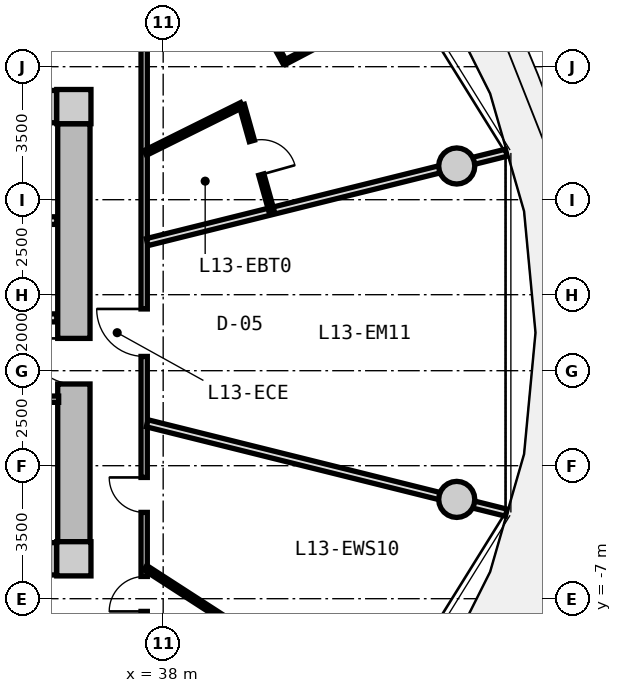
"""IFC4 building model, lengths in metres.
Left out: names, types, materials, properties, quantities, classifications, styles, units other than length and angle.
Written with IfcOpenShell. Run it as: python <this file> out.ifc"""

import sys

from ifc_helpers import new_model, si_unit, direction, frame, frame_2d, origin, origin_2d, place, context, subcontext, project, spatial, rectangle, circle, extrude, source, transform, mapped, element, fill, save


model = new_model("IFC4")
c1 = context("Model", 3, precision=1e-05, world=origin(), true_north=direction((0.0, 1.0)))
c2 = subcontext(c1, "Body", "Model", "MODEL_VIEW")
j1 = project(units=[si_unit("LENGTHUNIT", "METRE"), si_unit("PLANEANGLEUNIT", "RADIAN")], contexts=[c1])
p1 = place(None, origin())
s1 = spatial("IfcSite", under=j1, at=p1, CompositionType="ELEMENT")
p2 = place(p1, origin())
s2 = spatial("IfcBuilding", under=s1, at=p2, CompositionType="ELEMENT")
p3 = place(p2, frame((0.0, 0.0, 46.0)))
s3 = spatial("IfcBuildingStorey", under=s2, at=p3, CompositionType="ELEMENT", Elevation=46.0)
m1 = source(origin(), c2, "Body", "SweptSolid", [
    extrude(rectangle(XDim=0.9, YDim=0.9, at=origin_2d()), origin(), (0.0, 0.0, 1.0), 3.05),
])
for number, where, z_axis, x_axis in (
    (1, (35.65, -5.95, 0.0), (0.0, 0.0, 1.0), (1.0, 0.0, 0.0)),
    (2, (35.65, 5.95, 0.0), (0.0, 0.0, 1.0), (1.0, 0.0, 0.0)),
):
    element("IfcColumn", number, at=place(p3, frame(where, z_axis=z_axis, x_axis=x_axis)), inside=s3, PredefinedType="COLUMN", context=c2, shape_type="MappedRepresentation", body=[
        mapped(m1, transform((0.0, 0.0, 0.0), x_axis=(1.0, 0.0, 0.0), y_axis=(0.0, 1.0, 0.0), z_axis=(0.0, 0.0, 1.0), scale=1.0)),
    ])
m2 = source(origin(), c2, "Body", "SweptSolid", [
    extrude(rectangle(XDim=14.4, YDim=0.85, at=frame_2d((7.2, 0.0))), origin(), (0.0, 0.0, 1.0), 2.79),
])
for number, where, z_axis, x_axis in (
    (3, (20.8, 5.95, 0.0), (0.0, 0.0, 1.0), (1.0, 0.0, 0.0)),
    (4, (35.2, -5.95, 0.0), (0.0, 0.0, 1.0), (-1.0, 0.0, 0.0)),
):
    element("IfcWall", number, at=place(p3, frame(where, z_axis=z_axis, x_axis=x_axis)), inside=s3, PredefinedType="SHEAR", context=c2, shape_type="MappedRepresentation", body=[
        mapped(m2, transform((0.0, 0.0, 0.0), x_axis=(1.0, 0.0, 0.0), y_axis=(0.0, 1.0, 0.0), z_axis=(0.0, 0.0, 1.0), scale=1.0)),
    ])
m3 = source(origin(), c2, "Body", "SweptSolid", [
    extrude(rectangle(XDim=11.0, YDim=0.85, at=frame_2d((5.5, 0.0))), origin(), (0.0, 0.0, 1.0), 2.79),
])
p4 = place(p3, frame((35.65, 5.5, 0.0), z_axis=(0.0, 0.0, 1.0), x_axis=(0.0, -1.0, 0.0)))
e5 = element("IfcWall", 5, at=p4, inside=s3, PredefinedType="SHEAR", context=c2, shape_type="MappedRepresentation", body=[
    mapped(m3, transform((0.0, 0.0, 0.0), x_axis=(1.0, 0.0, 0.0), y_axis=(0.0, 1.0, 0.0), z_axis=(0.0, 0.0, 1.0), scale=1.0)),
])
p5 = place(p4, frame((5.65, 0.0, 0.0)))
e6 = element("IfcOpeningElement", 6, at=p5, cuts=e5, PredefinedType="OPENING", context=c2, shape_type="SweptSolid", body=[
    extrude(rectangle(XDim=1.2, YDim=2.15, at=frame_2d((0.6, 1.075))), frame((0.0, 0.435, 0.0), z_axis=(0.0, -1.0, 0.0), x_axis=(1.0, 0.0, 0.0)), (0.0, 0.0, 1.0), 0.87),
])
m4 = source(origin(), c2, "Body", "SweptSolid", [
    extrude(circle(Radius=0.475, at=origin_2d()), origin(), (0.0, 0.0, 1.0), 3.05),
])
for number, where, z_axis, x_axis in (
    (7, (45.725, 4.387, 0.0), (0.0, 0.0, 1.0), (1.0, 0.0, 0.0)),
    (8, (45.725, -4.387, 0.0), (0.0, 0.0, 1.0), (1.0, 0.0, 0.0)),
):
    element("IfcColumn", number, at=place(p3, frame(where, z_axis=z_axis, x_axis=x_axis)), inside=s3, PredefinedType="COLUMN", context=c2, shape_type="MappedRepresentation", body=[
        mapped(m4, transform((0.0, 0.0, 0.0), x_axis=(1.0, 0.0, 0.0), y_axis=(0.0, 1.0, 0.0), z_axis=(0.0, 0.0, 1.0), scale=1.0)),
    ])
m5 = source(origin(), c2, "Body", "SweptSolid", [
    extrude(rectangle(XDim=3.2, YDim=0.2, at=frame_2d((1.6, 0.0))), origin(), (0.0, 0.0, 1.0), 2.775),
])
p6 = place(p3, frame((32.0, 2.95, 0.0), z_axis=(0.0, 0.0, 1.0), x_axis=(1.0, 0.0, 0.0)))
e9 = element("IfcWall", 9, at=p6, inside=s3, PredefinedType="PARTITIONING", context=c2, shape_type="MappedRepresentation", body=[
    mapped(m5, transform((0.0, 0.0, 0.0), x_axis=(1.0, 0.0, 0.0), y_axis=(0.0, 1.0, 0.0), z_axis=(0.0, 0.0, 1.0), scale=1.0)),
])
m6 = source(origin(), c2, "Body", "SweptSolid", [
    extrude(rectangle(XDim=6.66, YDim=0.21, at=frame_2d((3.33, 0.0))), origin(), (0.0, 0.0, 1.0), 2.775),
])
p7 = place(p3, frame((28.54, 0.39, 0.0), z_axis=(0.0, 0.0, 1.0), x_axis=(1.0, 0.0, 0.0)))
e10 = element("IfcWall", 10, at=p7, inside=s3, PredefinedType="PARTITIONING", context=c2, shape_type="MappedRepresentation", body=[
    mapped(m6, transform((0.0, 0.0, 0.0), x_axis=(1.0, 0.0, 0.0), y_axis=(0.0, 1.0, 0.0), z_axis=(0.0, 0.0, 1.0), scale=1.0)),
])
p8 = place(p7, frame((1.0, 0.0, 0.0)))
e11 = element("IfcOpeningElement", 11, at=p8, cuts=e10, PredefinedType="OPENING", context=c2, shape_type="SweptSolid", body=[
    extrude(rectangle(XDim=1.2, YDim=2.15, at=frame_2d((0.6, 1.075))), frame((0.0, 0.115, 0.0), z_axis=(0.0, -1.0, 0.0), x_axis=(1.0, 0.0, 0.0)), (0.0, 0.0, 1.0), 0.23),
])
m7 = source(origin(), c2, "Body", "SweptSolid", [
    extrude(rectangle(XDim=2.7, YDim=0.165, at=frame_2d((1.35, 0.0))), origin(), (0.0, 0.0, 1.0), 2.775),
])
p9 = place(p3, frame((32.55, -1.75, 0.0), z_axis=(0.0, 0.0, 1.0), x_axis=(1.0, 0.0, 0.0)))
e12 = element("IfcWall", 12, at=p9, inside=s3, PredefinedType="PARTITIONING", context=c2, shape_type="MappedRepresentation", body=[
    mapped(m7, transform((0.0, 0.0, 0.0), x_axis=(1.0, 0.0, 0.0), y_axis=(0.0, 1.0, 0.0), z_axis=(0.0, 0.0, 1.0), scale=1.0)),
])
p10 = place(p9, frame((0.85, 0.0, 0.0)))
e13 = element("IfcOpeningElement", 13, at=p10, cuts=e12, PredefinedType="OPENING", context=c2, shape_type="SweptSolid", body=[
    extrude(rectangle(XDim=0.925, YDim=2.1, at=frame_2d((0.462, 1.05))), frame((0.0, 0.093, 0.0), z_axis=(0.0, -1.0, 0.0), x_axis=(1.0, 0.0, 0.0)), (0.0, 0.0, 1.0), 0.185),
])
m8 = source(origin(), c2, "Body", "SweptSolid", [
    extrude(rectangle(XDim=15.6, YDim=0.165, at=frame_2d((7.8, 0.0))), origin(), (0.0, 0.0, 1.0), 2.775),
])
p11 = place(p3, frame((37.5, 7.8, 0.0), z_axis=(0.0, 0.0, 1.0), x_axis=(0.0, -1.0, 0.0)))
e14 = element("IfcWall", 14, at=p11, inside=s3, PredefinedType="PARTITIONING", context=c2, shape_type="MappedRepresentation", body=[
    mapped(m8, transform((0.0, 0.0, 0.0), x_axis=(1.0, 0.0, 0.0), y_axis=(0.0, 1.0, 0.0), z_axis=(0.0, 0.0, 1.0), scale=1.0)),
])
p12 = place(p11, frame((14.215, 0.0, 0.0)))
e15 = element("IfcOpeningElement", 15, at=p12, cuts=e14, PredefinedType="OPENING", context=c2, shape_type="SweptSolid", body=[
    extrude(rectangle(XDim=0.92, YDim=2.1, at=frame_2d((0.46, 1.05))), frame((0.0, 0.093, 0.0), z_axis=(0.0, -1.0, 0.0), x_axis=(1.0, 0.0, 0.0)), (0.0, 0.0, 1.0), 0.185),
])
p13 = place(p11, frame((11.609, 0.0, 0.0)))
e16 = element("IfcOpeningElement", 16, at=p13, cuts=e14, PredefinedType="OPENING", context=c2, shape_type="SweptSolid", body=[
    extrude(rectangle(XDim=0.92, YDim=2.1, at=frame_2d((0.46, 1.05))), frame((0.0, 0.093, 0.0), z_axis=(0.0, -1.0, 0.0), x_axis=(1.0, 0.0, 0.0)), (0.0, 0.0, 1.0), 0.185),
])
p14 = place(p11, frame((7.175, 0.0, 0.0)))
e17 = element("IfcOpeningElement", 17, at=p14, cuts=e14, PredefinedType="OPENING", context=c2, shape_type="SweptSolid", body=[
    extrude(rectangle(XDim=1.25, YDim=2.2, at=frame_2d((0.625, 1.1))), frame((0.0, 0.093, 0.0), z_axis=(0.0, -1.0, 0.0), x_axis=(1.0, 0.0, 0.0)), (0.0, 0.0, 1.0), 0.185),
])
m9 = source(origin(), c2, "Body", "SweptSolid", [
    extrude(rectangle(XDim=9.737, YDim=0.19, at=frame_2d((4.869, 0.0))), origin(), (0.0, 0.0, 1.0), 2.225),
])
p15 = place(p3, frame((37.58, -2.385, 0.0), z_axis=(0.0, 0.0, 1.0), x_axis=(0.970392716238, -0.241532557375, 0.0)))
e18 = element("IfcWall", 18, at=p15, inside=s3, PredefinedType="PARTITIONING", context=c2, shape_type="MappedRepresentation", body=[
    mapped(m9, transform((0.0, 0.0, 0.0), x_axis=(1.0, 0.0, 0.0), y_axis=(0.0, 1.0, 0.0), z_axis=(0.0, 0.0, 1.0), scale=1.0)),
])
m10 = source(origin(), c2, "Body", "SweptSolid", [
    extrude(rectangle(XDim=7.304, YDim=0.14, at=frame_2d((3.652, 0.0))), origin(), (0.0, 0.0, 1.0), 2.775),
])
p16 = place(p3, frame((37.53, -6.185, 0.0), z_axis=(0.0, 0.0, 1.0), x_axis=(0.83973870965, -0.54299069929, 0.0)))
e19 = element("IfcWall", 19, at=p16, inside=s3, PredefinedType="PARTITIONING", context=c2, shape_type="MappedRepresentation", body=[
    mapped(m10, transform((0.0, 0.0, 0.0), x_axis=(1.0, 0.0, 0.0), y_axis=(0.0, 1.0, 0.0), z_axis=(0.0, 0.0, 1.0), scale=1.0)),
])
p17 = place(p3, frame((37.58, 2.385, 0.0), z_axis=(0.0, 0.0, 1.0), x_axis=(0.970392716238, 0.241532557375, 0.0)))
e20 = element("IfcWall", 20, at=p17, inside=s3, PredefinedType="PARTITIONING", context=c2, shape_type="MappedRepresentation", body=[
    mapped(m9, transform((0.0, 0.0, 0.0), x_axis=(1.0, 0.0, 0.0), y_axis=(0.0, 1.0, 0.0), z_axis=(0.0, 0.0, 1.0), scale=1.0)),
])
m11 = source(origin(), c2, "Body", "SweptSolid", [
    extrude(rectangle(XDim=2.834, YDim=0.14, at=frame_2d((1.417, 0.0))), origin(), (0.0, 0.0, 1.0), 2.775),
])
p18 = place(p3, frame((37.53, 4.732, 0.0), z_axis=(0.0, 0.0, 1.0), x_axis=(0.895681174462, 0.444696788513, 0.0)))
e21 = element("IfcWall", 21, at=p18, inside=s3, PredefinedType="PARTITIONING", context=c2, shape_type="MappedRepresentation", body=[
    mapped(m11, transform((0.0, 0.0, 0.0), x_axis=(1.0, 0.0, 0.0), y_axis=(0.0, 1.0, 0.0), z_axis=(0.0, 0.0, 1.0), scale=1.0)),
])
m12 = source(origin(), c2, "Body", "SweptSolid", [
    extrude(rectangle(XDim=2.885, YDim=0.14, at=frame_2d((1.442, 0.0))), origin(), (0.0, 0.0, 1.0), 2.775),
])
p19 = place(p3, frame((40.069, 5.992, 0.0), z_axis=(0.0, 0.0, 1.0), x_axis=(0.269799431837, -0.962916541856, 0.0)))
e22 = element("IfcWall", 22, at=p19, inside=s3, PredefinedType="PARTITIONING", context=c2, shape_type="MappedRepresentation", body=[
    mapped(m12, transform((0.0, 0.0, 0.0), x_axis=(1.0, 0.0, 0.0), y_axis=(0.0, 1.0, 0.0), z_axis=(0.0, 0.0, 1.0), scale=1.0)),
])
p20 = place(p19, frame((0.982, 0.0, 0.0)))
e23 = element("IfcOpeningElement", 23, at=p20, cuts=e22, PredefinedType="OPENING", context=c2, shape_type="SweptSolid", body=[
    extrude(rectangle(XDim=0.92, YDim=2.1, at=frame_2d((0.46, 1.05))), frame((0.0, 0.08, 0.0), z_axis=(0.0, -1.0, 0.0), x_axis=(1.0, 0.0, 0.0)), (0.0, 0.0, 1.0), 0.16),
])
m13 = source(origin(), c2, "Body", "SweptSolid", [
    extrude(rectangle(XDim=3.706, YDim=0.115, at=frame_2d((1.853, 0.0))), origin(), (0.0, 0.0, 1.0), 2.775),
])
p21 = place(p3, frame((41.198, 7.115, 0.0), z_axis=(0.0, 0.0, 1.0), x_axis=(0.88538502503, 0.464858427322, 0.0)))
e24 = element("IfcWall", 24, at=p21, inside=s3, PredefinedType="PARTITIONING", context=c2, shape_type="MappedRepresentation", body=[
    mapped(m13, transform((0.0, 0.0, 0.0), x_axis=(1.0, 0.0, 0.0), y_axis=(0.0, 1.0, 0.0), z_axis=(0.0, 0.0, 1.0), scale=1.0)),
])
m14 = source(origin(), c2, "Body", "SweptSolid", [
    extrude(rectangle(XDim=3.926, YDim=0.115, at=frame_2d((1.963, 0.0))), origin(), (0.0, 0.0, 1.0), 2.775),
])
p22 = place(p3, frame((41.198, 7.115, 0.0), z_axis=(0.0, 0.0, 1.0), x_axis=(-0.483037889915, 0.875599450038, 0.0)))
e25 = element("IfcWall", 25, at=p22, inside=s3, PredefinedType="PARTITIONING", context=c2, shape_type="MappedRepresentation", body=[
    mapped(m14, transform((0.0, 0.0, 0.0), x_axis=(1.0, 0.0, 0.0), y_axis=(0.0, 1.0, 0.0), z_axis=(0.0, 0.0, 1.0), scale=1.0)),
])
p23 = place(p22, frame((1.488, 0.0, 0.0)))
e26 = element("IfcOpeningElement", 26, at=p23, cuts=e25, PredefinedType="OPENING", context=c2, shape_type="SweptSolid", body=[
    extrude(rectangle(XDim=0.95, YDim=2.1, at=frame_2d((0.475, 1.05))), frame((0.0, 0.067, 0.0), z_axis=(0.0, -1.0, 0.0), x_axis=(1.0, 0.0, 0.0)), (0.0, 0.0, 1.0), 0.135),
])
m15 = source(origin(), c2, "Body", "SweptSolid", [
    extrude(rectangle(XDim=1.2, YDim=2.15, at=frame_2d((0.6, 1.075))), frame((0.0, 0.025, 0.0), z_axis=(0.0, -1.0, 0.0), x_axis=(1.0, 0.0, 0.0)), (0.0, 0.0, 1.0), 0.05),
])
p24 = place(p5, frame((1.2, 0.0, 0.0), z_axis=(0.0, 0.0, 1.0), x_axis=(-1.0, 0.0, 0.0)))
e27 = element("IfcDoor", 27, at=p24, inside=s3, OperationType="SINGLE_SWING_RIGHT", PredefinedType="DOOR", context=c2, shape_type="MappedRepresentation", body=[
    mapped(m15, transform((0.0, 0.0, 0.0), x_axis=(1.0, 0.0, 0.0), y_axis=(0.0, 1.0, 0.0), z_axis=(0.0, 0.0, 1.0), scale=1.0)),
])
fill(e6, e27)
m16 = source(origin(), c2, "Body", "SweptSolid", [
    extrude(rectangle(XDim=0.92, YDim=2.1, at=frame_2d((0.46, 1.05))), frame((0.0, 0.025, 0.0), z_axis=(0.0, -1.0, 0.0), x_axis=(1.0, 0.0, 0.0)), (0.0, 0.0, 1.0), 0.05),
])
p25 = place(p12, frame((0.92, 0.0, 0.0), z_axis=(0.0, 0.0, 1.0), x_axis=(-1.0, 0.0, 0.0)))
e28 = element("IfcDoor", 28, at=p25, inside=s3, OperationType="SINGLE_SWING_LEFT", PredefinedType="DOOR", context=c2, shape_type="MappedRepresentation", body=[
    mapped(m16, transform((0.0, 0.0, 0.0), x_axis=(1.0, 0.0, 0.0), y_axis=(0.0, 1.0, 0.0), z_axis=(0.0, 0.0, 1.0), scale=1.0)),
])
fill(e15, e28)
p26 = place(p13, frame((0.92, 0.0, 0.0), z_axis=(0.0, 0.0, 1.0), x_axis=(-1.0, 0.0, 0.0)))
e29 = element("IfcDoor", 29, at=p26, inside=s3, OperationType="SINGLE_SWING_RIGHT", PredefinedType="DOOR", context=c2, shape_type="MappedRepresentation", body=[
    mapped(m16, transform((0.0, 0.0, 0.0), x_axis=(1.0, 0.0, 0.0), y_axis=(0.0, 1.0, 0.0), z_axis=(0.0, 0.0, 1.0), scale=1.0)),
])
fill(e16, e29)
m17 = source(origin(), c2, "Body", "SweptSolid", [
    extrude(rectangle(XDim=1.25, YDim=2.2, at=frame_2d((0.625, 1.1))), frame((0.0, 0.025, 0.0), z_axis=(0.0, -1.0, 0.0), x_axis=(1.0, 0.0, 0.0)), (0.0, 0.0, 1.0), 0.05),
])
p27 = place(p14, frame((1.25, 0.0, 0.0), z_axis=(0.0, 0.0, 1.0), x_axis=(-1.0, 0.0, 0.0)))
e30 = element("IfcDoor", 30, at=p27, inside=s3, OperationType="SINGLE_SWING_RIGHT", PredefinedType="DOOR", context=c2, shape_type="MappedRepresentation", body=[
    mapped(m17, transform((0.0, 0.0, 0.0), x_axis=(1.0, 0.0, 0.0), y_axis=(0.0, 1.0, 0.0), z_axis=(0.0, 0.0, 1.0), scale=1.0)),
])
fill(e17, e30)
p28 = place(p20, origin())
e31 = element("IfcDoor", 31, at=p28, inside=s3, OperationType="SINGLE_SWING_RIGHT", PredefinedType="DOOR", context=c2, shape_type="MappedRepresentation", body=[
    mapped(m16, transform((0.0, 0.0, 0.0), x_axis=(1.0, 0.0, 0.0), y_axis=(0.0, 1.0, 0.0), z_axis=(0.0, 0.0, 1.0), scale=1.0)),
])
fill(e23, e31)
save(model, sys.argv[1])
